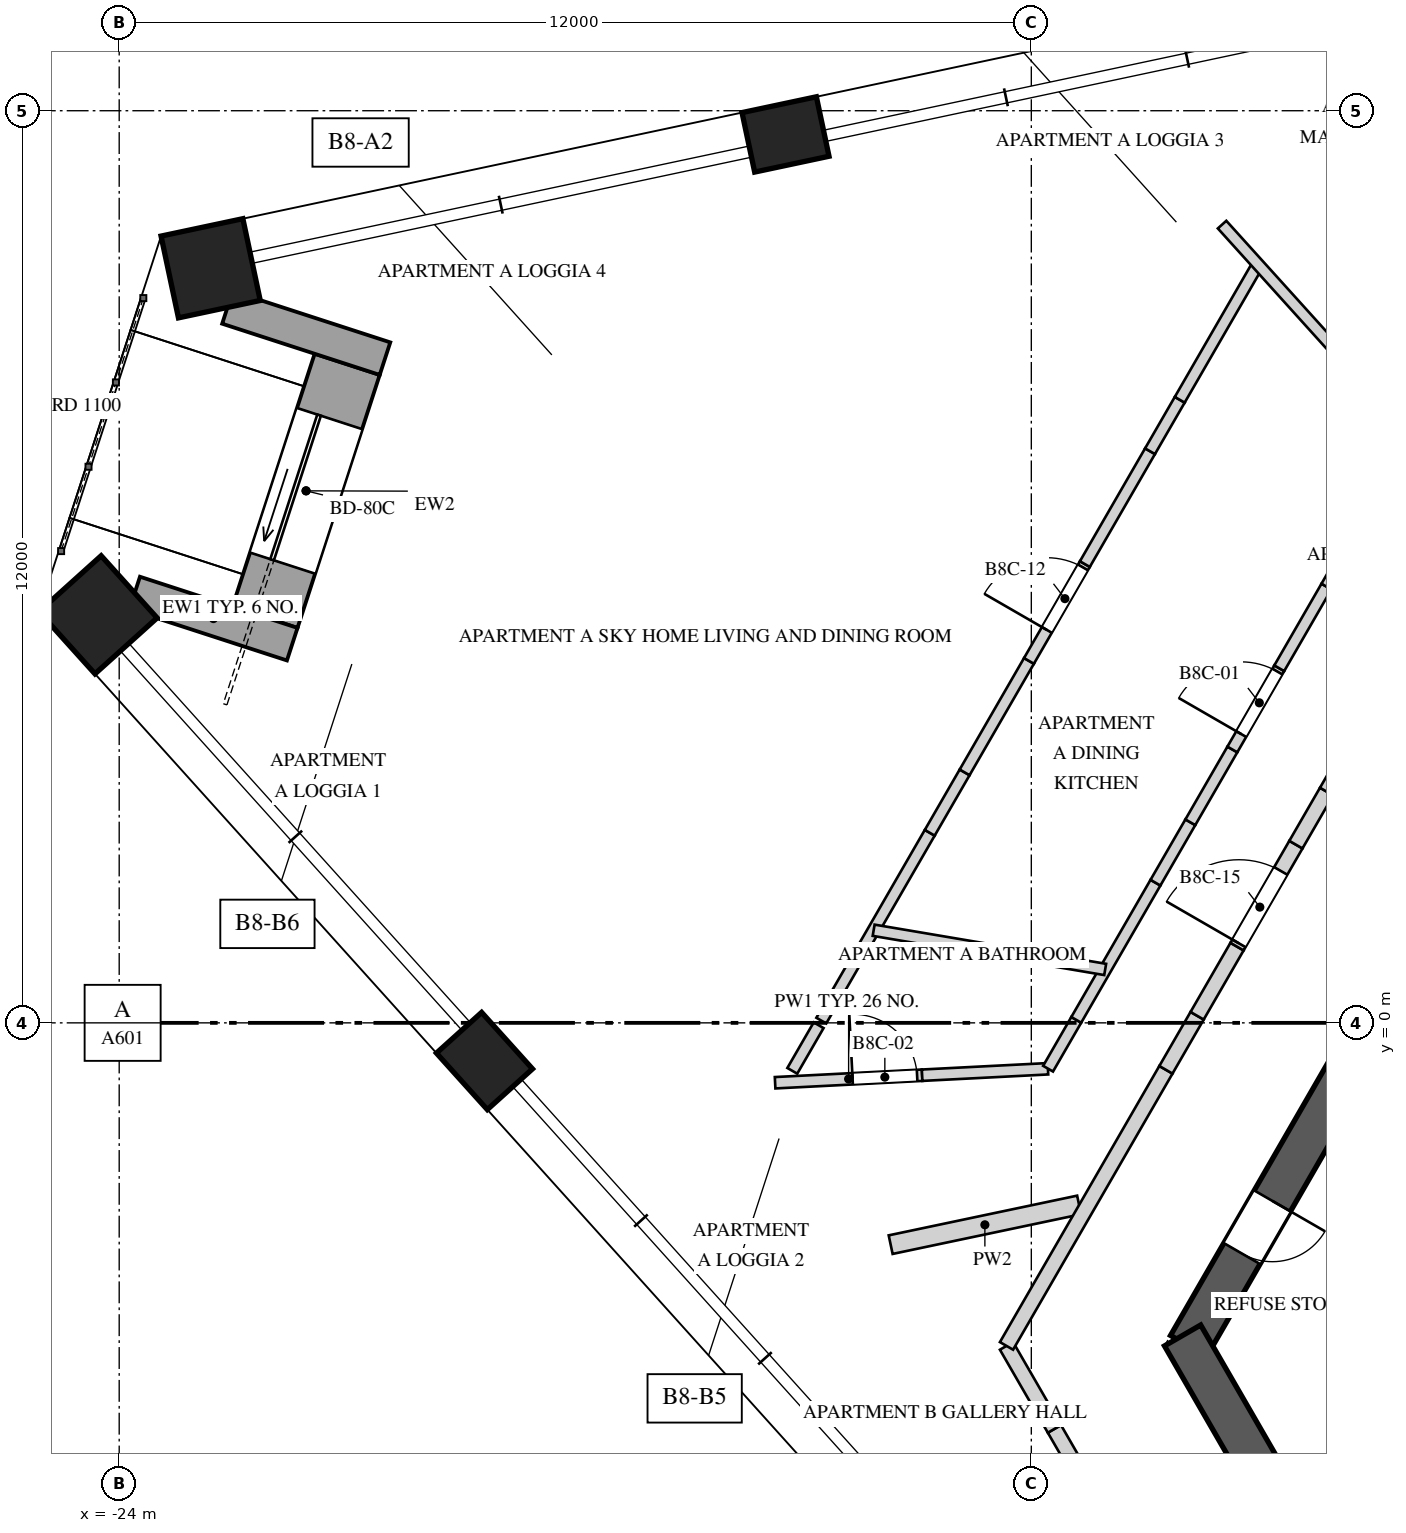
"""IFC4 building model, lengths in metres.
Left out: names, types, materials, properties, quantities, classifications, styles, units other than length and angle.
Written with IfcOpenShell. Run it as: python <this file> out.ifc"""

import sys

from ifc_helpers import new_model, si_unit, direction, frame, frame_2d, origin, origin_2d, place, context, subcontext, project, spatial, polyline, rectangle, outline, extrude, element, fill, save


model = new_model("IFC4")
c1 = context("Model", 3, precision=1e-05, world=origin(), true_north=direction((0.0, 1.0)))
c2 = subcontext(c1, "Body", "Model", "MODEL_VIEW")
j1 = project(units=[si_unit("LENGTHUNIT", "METRE"), si_unit("PLANEANGLEUNIT", "RADIAN")], contexts=[c1])
p1 = place(None, origin())
s1 = spatial("IfcSite", under=j1, at=p1, CompositionType="ELEMENT")
p2 = place(p1, origin())
s2 = spatial("IfcBuilding", under=s1, at=p2, CompositionType="ELEMENT")
p3 = place(p2, frame((0.0, 0.0, 348.4)))
s3 = spatial("IfcBuildingStorey", under=s2, at=p3, CompositionType="ELEMENT", Elevation=348.4)
p4 = place(p3, frame((-1.285, 10.725, 0.0), z_axis=(0.0, 0.0, 1.0), x_axis=(-0.499994590896, -0.86602852671, 0.0)))
e1 = element("IfcWall", 1, at=p4, inside=s3, PredefinedType="SHEAR", context=c2, shape_type="SweptSolid", body=[
    extrude(rectangle(XDim=17.292, YDim=0.55, at=frame_2d((8.646, 0.0))), origin(), (0.0, 0.0, 1.0), 4.0),
])
p5 = place(p4, frame((6.851, 0.0, 0.0)))
e2 = element("IfcOpeningElement", 2, at=p5, cuts=e1, PredefinedType="OPENING", context=c2, shape_type="SweptSolid", body=[
    extrude(rectangle(XDim=1.0, YDim=2.4, at=frame_2d((0.5, 1.2))), frame((0.0, 0.285, 0.0), z_axis=(0.0, -1.0, 0.0), x_axis=(1.0, 0.0, 0.0)), (0.0, 0.0, 1.0), 0.57),
])
p6 = place(p4, frame((15.089, 0.0, 0.0)))
e3 = element("IfcOpeningElement", 3, at=p6, cuts=e1, PredefinedType="OPENING", context=c2, shape_type="SweptSolid", body=[
    extrude(rectangle(XDim=0.8, YDim=2.1, at=frame_2d((0.4, 1.05))), frame((0.0, 0.285, 0.0), z_axis=(0.0, -1.0, 0.0), x_axis=(1.0, 0.0, 0.0)), (0.0, 0.0, 1.0), 0.57),
])
p7 = place(p3, frame((-10.01, -4.113, 0.0), z_axis=(0.0, 0.0, 1.0), x_axis=(0.499995765644, -0.866027848477, 0.0)))
e4 = element("IfcWall", 4, at=p7, inside=s3, PredefinedType="SHEAR", context=c2, shape_type="SweptSolid", body=[
    extrude(rectangle(XDim=2.887, YDim=0.55, at=frame_2d((1.443, 0.0))), origin(), (0.0, 0.0, 1.0), 4.0),
])
p8 = place(p3, frame((-24.278, 5.368, 0.0), z_axis=(0.0, 0.0, 1.0), x_axis=(0.669130606359, -0.743144825477, 0.0)))
e5 = element("IfcColumn", 5, at=p8, inside=s3, PredefinedType="COLUMN", context=c2, shape_type="SweptSolid", body=[
    extrude(rectangle(XDim=1.1, YDim=1.1, at=origin_2d()), origin(), (0.0, 0.0, 1.0), 4.0),
])
for number, where, z_axis, x_axis in (
    (6, (-19.195, -0.502, 0.0), (0.0, 0.0, 1.0), (0.669, -0.743, 0.0)),
    (7, (-15.234, 11.688, 0.0), (0.0, 0.0, 1.0), (-0.978, -0.208, 0.0)),
):
    element("IfcColumn", number, at=place(p3, frame(where, z_axis=z_axis, x_axis=x_axis)), inside=s3, PredefinedType="COLUMN", context=c2, shape_type="SweptSolid", body=[
        extrude(rectangle(XDim=1.0, YDim=0.8, at=origin_2d()), origin(), (0.0, 0.0, 1.0), 4.0),
    ])
p9 = place(p3, frame((-22.797, 9.927, 0.0), z_axis=(0.0, 0.0, 1.0), x_axis=(-0.978147600734, -0.207911690818, 0.0)))
e8 = element("IfcColumn", 8, at=p9, inside=s3, PredefinedType="COLUMN", context=c2, shape_type="SweptSolid", body=[
    extrude(rectangle(XDim=1.1, YDim=1.1, at=origin_2d()), origin(), (0.0, 0.0, 1.0), 4.0),
])
p10 = place(p3, frame((-22.082, 5.335, 0.0), z_axis=(0.0, 0.0, 1.0), x_axis=(0.309019824916, 0.951055596592, 0.0)))
e9 = element("IfcWall", 9, at=p10, inside=s3, PredefinedType="SOLIDWALL", context=c2, shape_type="SweptSolid", body=[
    extrude(rectangle(XDim=3.5, YDim=0.9, at=frame_2d((1.75, 0.0))), origin(), (0.0, 0.0, 1.0), 3.3),
])
p11 = place(p10, frame((0.75, 0.0, 0.0)))
e10 = element("IfcOpeningElement", 10, at=p11, cuts=e9, PredefinedType="OPENING", context=c2, shape_type="SweptSolid", body=[
    extrude(rectangle(XDim=2.0, YDim=2.4, at=frame_2d((1.0, 1.2))), frame((0.0, 0.46, 0.0), z_axis=(0.0, -1.0, 0.0), x_axis=(1.0, 0.0, 0.0)), (0.0, 0.0, 1.0), 0.92),
])
for number, where, z_axis, x_axis in (
    (11, (-23.796, 5.655, 0.0), (0.0, 0.0, 1.0), (0.951, -0.309, 0.0)),
    (12, (-22.576, 9.412, 0.0), (0.0, 0.0, 1.0), (0.951, -0.309, 0.0)),
):
    element("IfcWall", number, at=place(p3, frame(where, z_axis=z_axis, x_axis=x_axis)), inside=s3, PredefinedType="SOLIDWALL", context=c2, shape_type="SweptSolid", body=[
        extrude(rectangle(XDim=2.179, YDim=0.45, at=frame_2d((1.09, 0.0))), origin(), (0.0, 0.0, 1.0), 2.55),
    ])
p12 = place(p3, frame((-15.371, -0.788, 0.0), z_axis=(0.0, 0.0, 1.0), x_axis=(0.998683196323, 0.051301787316, 0.0)))
e13 = element("IfcWall", 13, at=p12, inside=s3, PredefinedType="PARTITIONING", context=c2, shape_type="SweptSolid", body=[
    extrude(rectangle(XDim=1.937, YDim=0.15, at=frame_2d((0.968, 0.0))), origin(), (0.0, 0.0, 1.0), 3.65),
])
p13 = place(p12, frame((1.021, 0.0, 0.0)))
e14 = element("IfcOpeningElement", 14, at=p13, cuts=e13, PredefinedType="OPENING", context=c2, shape_type="SweptSolid", body=[
    extrude(rectangle(XDim=0.85, YDim=2.4, at=frame_2d((0.425, 1.2))), frame((0.0, 0.085, 0.0), z_axis=(0.0, -1.0, 0.0), x_axis=(1.0, 0.0, 0.0)), (0.0, 0.0, 1.0), 0.17),
])
p14 = place(p3, frame((-13.437, -0.689, 0.0), z_axis=(0.0, 0.0, 1.0), x_axis=(0.99869287416, 0.05111304238, 0.0)))
e15 = element("IfcWall", 15, at=p14, inside=s3, PredefinedType="PARTITIONING", context=c2, shape_type="SweptSolid", body=[
    extrude(rectangle(XDim=1.657, YDim=0.15, at=frame_2d((0.829, 0.0))), origin(), (0.0, 0.0, 1.0), 2.95),
])
p15 = place(p3, frame((-15.145, -0.631, 0.0), z_axis=(0.0, 0.0, 1.0), x_axis=(0.499966449638, 0.866044773228, 0.0)))
e16 = element("IfcWall", 16, at=p15, inside=s3, PredefinedType="PARTITIONING", context=c2, shape_type="SweptSolid", body=[
    extrude(rectangle(XDim=0.693, YDim=0.15, at=frame_2d((0.346, 0.0))), origin(), (0.0, 0.0, 1.0), 2.95),
])
p16 = place(p3, frame((-14.763, 0.03, 0.0), z_axis=(0.0, 0.0, 1.0), x_axis=(0.500003887042, 0.866023159588, 0.0)))
e17 = element("IfcWall", 17, at=p16, inside=s3, PredefinedType="PARTITIONING", context=c2, shape_type="SweptSolid", body=[
    extrude(rectangle(XDim=2.854, YDim=0.15, at=frame_2d((1.427, 0.0))), origin(), (0.0, 0.0, 1.0), 3.65),
])
p17 = place(p3, frame((-13.336, 2.501, 0.0), z_axis=(0.0, 0.0, 1.0), x_axis=(0.500144624036, 0.865941888956, 0.0)))
e18 = element("IfcWall", 18, at=p17, inside=s3, PredefinedType="PARTITIONING", context=c2, shape_type="SweptSolid", body=[
    extrude(rectangle(XDim=0.918, YDim=0.15, at=frame_2d((0.459, 0.0))), origin(), (0.0, 0.0, 1.0), 2.55),
])
p18 = place(p3, frame((-12.877, 3.295, 0.0), z_axis=(0.0, 0.0, 1.0), x_axis=(0.499876388284, 0.86609675928, 0.0)))
e19 = element("IfcWall", 19, at=p18, inside=s3, PredefinedType="PARTITIONING", context=c2, shape_type="SweptSolid", body=[
    extrude(rectangle(XDim=1.693, YDim=0.15, at=frame_2d((0.847, 0.0))), origin(), (0.0, 0.0, 1.0), 3.65),
])
p19 = place(p3, frame((-12.031, 4.762, 0.0), z_axis=(0.0, 0.0, 1.0), x_axis=(0.50006736263, 0.865986508459, 0.0)))
e20 = element("IfcWall", 20, at=p19, inside=s3, PredefinedType="PARTITIONING", context=c2, shape_type="SweptSolid", body=[
    extrude(outline(polyline([(0.0, 0.0), (1.47, 0.0), (1.471, 3.65), (0.881, 3.65), (0.881, 2.55), (0.0, 2.55), (0.0, 0.0)])), frame((0.0, 0.075, 0.0), z_axis=(0.0, -1.0, 0.0), x_axis=(1.0, 0.0, 0.0)), (0.0, 0.0, 1.0), 0.15),
])
p20 = place(p19, frame((0.471, 0.0, 0.0)))
e21 = element("IfcOpeningElement", 21, at=p20, cuts=e20, PredefinedType="OPENING", context=c2, shape_type="SweptSolid", body=[
    extrude(rectangle(XDim=0.95, YDim=2.4, at=frame_2d((0.475, 1.2))), frame((0.0, 0.085, 0.0), z_axis=(0.0, -1.0, 0.0), x_axis=(1.0, 0.0, 0.0)), (0.0, 0.0, 1.0), 0.17),
])
p21 = place(p3, frame((-11.296, 6.035, 0.0), z_axis=(0.0, 0.0, 1.0), x_axis=(0.500059337743, 0.865991142412, 0.0)))
e22 = element("IfcWall", 22, at=p21, inside=s3, PredefinedType="PARTITIONING", context=c2, shape_type="SweptSolid", body=[
    extrude(rectangle(XDim=1.715, YDim=0.15, at=frame_2d((0.857, 0.0))), origin(), (0.0, 0.0, 1.0), 3.65),
])
p22 = place(p3, frame((-10.438, 7.52, 0.0), z_axis=(0.0, 0.0, 1.0), x_axis=(0.500001804394, 0.866024362014, 0.0)))
e23 = element("IfcWall", 23, at=p22, inside=s3, PredefinedType="PARTITIONING", context=c2, shape_type="SweptSolid", body=[
    extrude(rectangle(XDim=0.782, YDim=0.15, at=frame_2d((0.391, 0.0))), origin(), (0.0, 0.0, 1.0), 2.75),
])
p23 = place(p3, frame((-10.047, 8.197, 0.0), z_axis=(0.0, 0.0, 1.0), x_axis=(0.499972721762, 0.86604115231, 0.0)))
e24 = element("IfcWall", 24, at=p23, inside=s3, PredefinedType="PARTITIONING", context=c2, shape_type="SweptSolid", body=[
    extrude(rectangle(XDim=2.055, YDim=0.15, at=frame_2d((1.027, 0.0))), origin(), (0.0, 0.0, 1.0), 3.65),
])
p24 = place(p3, frame((-11.78, -0.603, 0.0), z_axis=(0.0, 0.0, 1.0), x_axis=(0.49999788721, 0.866026623601, 0.0)))
e25 = element("IfcWall", 25, at=p24, inside=s3, PredefinedType="PARTITIONING", context=c2, shape_type="SweptSolid", body=[
    extrude(rectangle(XDim=0.742, YDim=0.15, at=frame_2d((0.371, 0.0))), origin(), (0.0, 0.0, 1.0), 2.95),
])
p25 = place(p3, frame((-11.409, 0.039, 0.0), z_axis=(0.0, 0.0, 1.0), x_axis=(0.499969202016, 0.866043184279, 0.0)))
e26 = element("IfcWall", 26, at=p25, inside=s3, PredefinedType="PARTITIONING", context=c2, shape_type="SweptSolid", body=[
    extrude(rectangle(XDim=2.084, YDim=0.15, at=frame_2d((1.042, 0.0))), origin(), (0.0, 0.0, 1.0), 3.65),
])
p26 = place(p3, frame((-10.367, 1.844, 0.0), z_axis=(0.0, 0.0, 1.0), x_axis=(0.499945096919, 0.866057099772, 0.0)))
e27 = element("IfcWall", 27, at=p26, inside=s3, PredefinedType="PARTITIONING", context=c2, shape_type="SweptSolid", body=[
    extrude(rectangle(XDim=0.917, YDim=0.15, at=frame_2d((0.459, 0.0))), origin(), (0.0, 0.0, 1.0), 2.55),
])
p27 = place(p3, frame((-9.908, 2.639, 0.0), z_axis=(0.0, 0.0, 1.0), x_axis=(0.500009088543, 0.866020156448, 0.0)))
e28 = element("IfcWall", 28, at=p27, inside=s3, PredefinedType="PARTITIONING", context=c2, shape_type="SweptSolid", body=[
    extrude(rectangle(XDim=1.106, YDim=0.15, at=frame_2d((0.553, 0.0))), origin(), (0.0, 0.0, 1.0), 3.65),
])
p28 = place(p3, frame((-9.355, 3.597, 0.0), z_axis=(0.0, 0.0, 1.0), x_axis=(0.499990780478, 0.866030726613, 0.0)))
e29 = element("IfcWall", 29, at=p28, inside=s3, PredefinedType="PARTITIONING", context=c2, shape_type="SweptSolid", body=[
    extrude(outline(polyline([(0.0, 0.0), (1.234, 0.0), (1.234, 3.65), (0.881, 3.65), (0.881, 2.55), (0.0, 2.55), (0.0, 0.0)])), frame((0.0, 0.075, 0.0), z_axis=(0.0, -1.0, 0.0), x_axis=(1.0, 0.0, 0.0)), (0.0, 0.0, 1.0), 0.15),
])
p29 = place(p28, frame((0.234, 0.0, 0.0)))
e30 = element("IfcOpeningElement", 30, at=p29, cuts=e29, PredefinedType="OPENING", context=c2, shape_type="SweptSolid", body=[
    extrude(rectangle(XDim=0.95, YDim=2.4, at=frame_2d((0.475, 1.2))), frame((0.0, 0.085, 0.0), z_axis=(0.0, -1.0, 0.0), x_axis=(1.0, 0.0, 0.0)), (0.0, 0.0, 1.0), 0.17),
])
p30 = place(p3, frame((-8.738, 4.665, 0.0), z_axis=(0.0, 0.0, 1.0), x_axis=(0.500012022864, 0.866018462269, 0.0)))
e31 = element("IfcWall", 31, at=p30, inside=s3, PredefinedType="PARTITIONING", context=c2, shape_type="SweptSolid", body=[
    extrude(rectangle(XDim=1.241, YDim=0.15, at=frame_2d((0.62, 0.0))), origin(), (0.0, 0.0, 1.0), 3.65),
])
p31 = place(p3, frame((-8.118, 5.74, 0.0), z_axis=(0.0, 0.0, 1.0), x_axis=(0.500001804394, 0.866024362014, 0.0)))
e32 = element("IfcWall", 32, at=p31, inside=s3, PredefinedType="PARTITIONING", context=c2, shape_type="SweptSolid", body=[
    extrude(rectangle(XDim=0.782, YDim=0.15, at=frame_2d((0.391, 0.0))), origin(), (0.0, 0.0, 1.0), 2.75),
])
p32 = place(p3, frame((-11.371, -2.396, 0.0), z_axis=(0.0, 0.0, 1.0), x_axis=(-0.978528309704, -0.20611246228, 0.0)))
e33 = element("IfcWall", 33, at=p32, inside=s3, PredefinedType="SOLIDWALL", context=c2, shape_type="SweptSolid", body=[
    extrude(rectangle(XDim=2.534, YDim=0.25, at=frame_2d((1.267, 0.0))), origin(), (0.0, 0.0, 1.0), 3.65),
])
p33 = place(p3, frame((-11.028, 0.703, 0.0), z_axis=(0.0, 0.0, 1.0), x_axis=(-0.985959074205, 0.166987137207, 0.0)))
e34 = element("IfcWall", 34, at=p33, inside=s3, PredefinedType="PARTITIONING", context=c2, shape_type="SweptSolid", body=[
    extrude(rectangle(XDim=3.089, YDim=0.15, at=frame_2d((1.545, 0.0))), origin(), (0.0, 0.0, 1.0), 3.65),
])
p34 = place(p3, frame((-9.49, 10.502, 0.0), z_axis=(0.0, 0.0, 1.0), x_axis=(0.670469300735, -0.741937272801, 0.0)))
e35 = element("IfcWall", 35, at=p34, inside=s3, PredefinedType="PARTITIONING", context=c2, shape_type="SweptSolid", body=[
    extrude(rectangle(XDim=3.672, YDim=0.15, at=frame_2d((1.836, 0.0))), origin(), (0.0, 0.0, 1.0), 3.65),
])
p35 = place(p3, frame((-11.345, -5.949, 0.0), z_axis=(0.0, 0.0, 1.0), x_axis=(-0.499993523031, 0.866029143232, 0.0)))
e36 = element("IfcWall", 36, at=p35, inside=s3, PredefinedType="SOLIDWALL", context=c2, shape_type="SweptSolid", body=[
    extrude(rectangle(XDim=0.702, YDim=0.2, at=frame_2d((0.351, 0.0))), origin(), (0.0, 0.0, 1.0), 2.95),
])
p36 = place(p3, frame((-11.696, -5.342, 0.0), z_axis=(0.0, 0.0, 1.0), x_axis=(-0.500013012896, 0.866017890655, 0.0)))
e37 = element("IfcWall", 37, at=p36, inside=s3, PredefinedType="SOLIDWALL", context=c2, shape_type="SweptSolid", body=[
    extrude(rectangle(XDim=1.261, YDim=0.2, at=frame_2d((0.63, 0.0))), origin(), (0.0, 0.0, 1.0), 3.65),
])
p37 = place(p3, frame((-12.326, -4.25, 0.0), z_axis=(0.0, 0.0, 1.0), x_axis=(0.499982771656, 0.866035350345, 0.0)))
e38 = element("IfcWall", 38, at=p37, inside=s3, PredefinedType="SOLIDWALL", context=c2, shape_type="SweptSolid", body=[
    extrude(rectangle(XDim=4.195, YDim=0.2, at=frame_2d((2.097, 0.0))), origin(), (0.0, 0.0, 1.0), 3.65),
])
p38 = place(p3, frame((-10.229, -0.617, 0.0), z_axis=(0.0, 0.0, 1.0), x_axis=(0.5001686003, 0.865928040471, 0.0)))
e39 = element("IfcWall", 39, at=p38, inside=s3, PredefinedType="SOLIDWALL", context=c2, shape_type="SweptSolid", body=[
    extrude(rectangle(XDim=0.821, YDim=0.2, at=frame_2d((0.411, 0.0))), origin(), (0.0, 0.0, 1.0), 2.95),
])
p39 = place(p3, frame((-9.819, 0.094, 0.0), z_axis=(0.0, 0.0, 1.0), x_axis=(0.499890179513, 0.866088799389, 0.0)))
e40 = element("IfcWall", 40, at=p39, inside=s3, PredefinedType="SOLIDWALL", context=c2, shape_type="SweptSolid", body=[
    extrude(rectangle(XDim=1.05, YDim=0.2, at=frame_2d((0.525, 0.0))), origin(), (0.0, 0.0, 1.0), 3.65),
])
p40 = place(p3, frame((-9.294, 1.003, 0.0), z_axis=(0.0, 0.0, 1.0), x_axis=(0.500054401891, 0.86599399256, 0.0)))
e41 = element("IfcWall", 41, at=p40, inside=s3, PredefinedType="SOLIDWALL", context=c2, shape_type="SweptSolid", body=[
    extrude(outline(polyline([(0.0, 0.0), (1.549, 0.0), (1.549, 2.55), (0.605, 2.55), (0.605, 3.65), (0.0, 3.65), (0.0, 0.0)])), frame((0.0, 0.1, 0.0), z_axis=(0.0, -1.0, 0.0), x_axis=(1.0, 0.0, 0.0)), (0.0, 0.0, 1.0), 0.2),
])
p41 = place(p40, frame((0.05, 0.0, 0.0)))
e42 = element("IfcOpeningElement", 42, at=p41, cuts=e41, PredefinedType="OPENING", context=c2, shape_type="SweptSolid", body=[
    extrude(rectangle(XDim=1.1, YDim=2.4, at=frame_2d((0.55, 1.2))), frame((0.0, 0.11, 0.0), z_axis=(0.0, -1.0, 0.0), x_axis=(1.0, 0.0, 0.0)), (0.0, 0.0, 1.0), 0.22),
])
p42 = place(p3, frame((-8.519, 2.344, 0.0), z_axis=(0.0, 0.0, 1.0), x_axis=(0.499914554297, 0.866074730264, 0.0)))
e43 = element("IfcWall", 43, at=p42, inside=s3, PredefinedType="SOLIDWALL", context=c2, shape_type="SweptSolid", body=[
    extrude(rectangle(XDim=0.807, YDim=0.2, at=frame_2d((0.403, 0.0))), origin(), (0.0, 0.0, 1.0), 3.65),
])
p43 = place(p3, frame((-8.116, 3.043, 0.0), z_axis=(0.0, 0.0, 1.0), x_axis=(0.499994660107, 0.866028486751, 0.0)))
e44 = element("IfcWall", 44, at=p43, inside=s3, PredefinedType="SOLIDWALL", context=c2, shape_type="SweptSolid", body=[
    extrude(rectangle(XDim=0.906, YDim=0.2, at=frame_2d((0.453, 0.0))), origin(), (0.0, 0.0, 1.0), 2.55),
])
p44 = place(p11, origin())
e45 = element("IfcDoor", 45, at=p44, inside=s3, OperationType="SLIDING_TO_LEFT", PredefinedType="DOOR", context=c2, shape_type="SweptSolid", body=[
    extrude(rectangle(XDim=2.0, YDim=2.4, at=frame_2d((1.0, 1.2))), frame((0.0, 0.025, 0.0), z_axis=(0.0, -1.0, 0.0), x_axis=(1.0, 0.0, 0.0)), (0.0, 0.0, 1.0), 0.05),
])
fill(e10, e45)
p45 = place(p6, origin())
e46 = element("IfcDoor", 46, at=p45, inside=s3, OperationType="SINGLE_SWING_LEFT", PredefinedType="DOOR", context=c2, shape_type="SweptSolid", body=[
    extrude(rectangle(XDim=0.8, YDim=2.1, at=frame_2d((0.4, 1.05))), frame((0.0, 0.025, 0.0), z_axis=(0.0, -1.0, 0.0), x_axis=(1.0, 0.0, 0.0)), (0.0, 0.0, 1.0), 0.05),
])
fill(e3, e46)
p46 = place(p29, origin())
e47 = element("IfcDoor", 47, at=p46, inside=s3, OperationType="SINGLE_SWING_LEFT", PredefinedType="DOOR", context=c2, shape_type="SweptSolid", body=[
    extrude(rectangle(XDim=0.95, YDim=2.4, at=frame_2d((0.475, 1.2))), frame((0.0, 0.025, 0.0), z_axis=(0.0, -1.0, 0.0), x_axis=(1.0, 0.0, 0.0)), (0.0, 0.0, 1.0), 0.05),
])
fill(e30, e47)
p47 = place(p13, origin())
e48 = element("IfcDoor", 48, at=p47, inside=s3, OperationType="SINGLE_SWING_RIGHT", PredefinedType="DOOR", context=c2, shape_type="SweptSolid", body=[
    extrude(rectangle(XDim=0.85, YDim=2.4, at=frame_2d((0.425, 1.2))), frame((0.0, 0.025, 0.0), z_axis=(0.0, -1.0, 0.0), x_axis=(1.0, 0.0, 0.0)), (0.0, 0.0, 1.0), 0.05),
])
fill(e14, e48)
p48 = place(p20, origin())
e49 = element("IfcDoor", 49, at=p48, inside=s3, OperationType="SINGLE_SWING_RIGHT", PredefinedType="DOOR", context=c2, shape_type="SweptSolid", body=[
    extrude(rectangle(XDim=0.95, YDim=2.4, at=frame_2d((0.475, 1.2))), frame((0.0, 0.025, 0.0), z_axis=(0.0, -1.0, 0.0), x_axis=(1.0, 0.0, 0.0)), (0.0, 0.0, 1.0), 0.05),
])
fill(e21, e49)
p49 = place(p41, origin())
e50 = element("IfcDoor", 50, at=p49, inside=s3, OperationType="SINGLE_SWING_LEFT", PredefinedType="DOOR", context=c2, shape_type="SweptSolid", body=[
    extrude(rectangle(XDim=1.1, YDim=2.4, at=frame_2d((0.55, 1.2))), frame((0.0, 0.025, 0.0), z_axis=(0.0, -1.0, 0.0), x_axis=(1.0, 0.0, 0.0)), (0.0, 0.0, 1.0), 0.05),
])
fill(e42, e50)
save(model, sys.argv[1])
